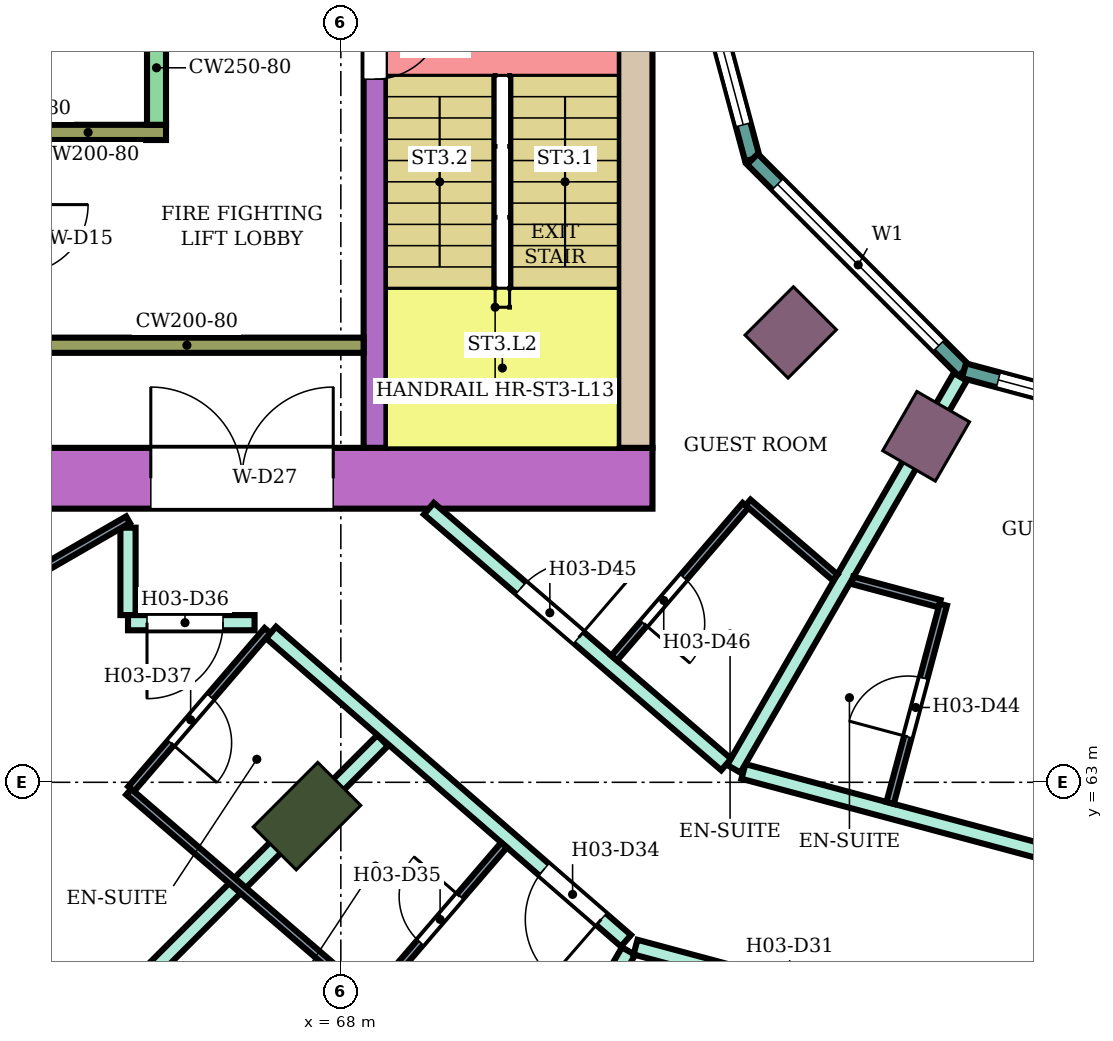
"""IFC4 building model, lengths in metres.
Left out: names, types, materials, properties, quantities, classifications, styles, units other than length and angle.
Written with IfcOpenShell. Run it as: python <this file> out.ifc"""

import sys

from ifc_helpers import new_model, si_unit, direction, frame, frame_2d, origin, origin_2d, place, context, subcontext, project, spatial, rectangle, extrude, element, fill, save


model = new_model("IFC4")
c1 = context("Model", 3, precision=1e-05, world=origin(), true_north=direction((0.0, 1.0)))
c2 = subcontext(c1, "Body", "Model", "MODEL_VIEW")
j1 = project(units=[si_unit("LENGTHUNIT", "METRE"), si_unit("PLANEANGLEUNIT", "RADIAN")], contexts=[c1])
p1 = place(None, origin())
s1 = spatial("IfcSite", under=j1, at=p1, CompositionType="ELEMENT")
p2 = place(p1, origin())
s2 = spatial("IfcBuilding", under=s1, at=p2, CompositionType="ELEMENT")
p3 = place(p2, frame((0.0, 0.0, 59.2)))
s3 = spatial("IfcBuildingStorey", under=s2, at=p3, CompositionType="ELEMENT", Elevation=59.2)
p4 = place(p3, frame((67.555, 62.555, 0.0), z_axis=(0.0, 0.0, 1.0), x_axis=(-0.707106781187, -0.707106781187, 0.0)))
e1 = element("IfcColumn", 1, at=p4, inside=s3, PredefinedType="COLUMN", context=c2, shape_type="SweptSolid", body=[
    extrude(rectangle(XDim=1.2, YDim=0.8, at=origin_2d()), origin(), (0.0, 0.0, 1.0), 3.8),
])
for number, where, z_axis, x_axis in (
    (2, (73.919, 68.919, 0.0), (0.0, 0.0, 1.0), (-0.707, -0.707, 0.0)),
    (3, (75.7, 67.552, 0.0), (0.0, 0.0, 1.0), (-0.5, -0.866, 0.0)),
):
    element("IfcColumn", number, at=place(p3, frame(where, z_axis=z_axis, x_axis=x_axis)), inside=s3, PredefinedType="COLUMN", context=c2, shape_type="SweptSolid", body=[
        extrude(rectangle(XDim=0.9, YDim=0.8, at=origin_2d()), origin(), (0.0, 0.0, 1.0), 3.8),
    ])
p5 = place(p3, frame((72.1, 67.0, 0.0), z_axis=(0.0, 0.0, 1.0), x_axis=(-1.0, 0.0, 0.0)))
e4 = element("IfcWall", 4, at=p5, inside=s3, PredefinedType="SHEAR", context=c2, shape_type="SweptSolid", body=[
    extrude(rectangle(XDim=14.7, YDim=0.8, at=frame_2d((7.35, 0.0))), origin(), (0.0, 0.0, 1.0), 3.48),
])
p6 = place(p5, frame((4.2, 0.0, 0.0)))
e5 = element("IfcOpeningElement", 5, at=p6, cuts=e4, PredefinedType="OPENING", context=c2, shape_type="SweptSolid", body=[
    extrude(rectangle(XDim=2.4, YDim=2.4, at=frame_2d((1.2, 1.2))), frame((0.0, 0.41, 0.0), z_axis=(0.0, -1.0, 0.0), x_axis=(1.0, 0.0, 0.0)), (0.0, 0.0, 1.0), 0.82),
])
p7 = place(p3, frame((71.875, 75.0, 0.0), z_axis=(0.0, 0.0, 1.0), x_axis=(0.0, -1.0, 0.0)))
e6 = element("IfcWall", 6, at=p7, inside=s3, PredefinedType="SHEAR", context=c2, shape_type="SweptSolid", body=[
    extrude(rectangle(XDim=7.6, YDim=0.45, at=frame_2d((3.8, 0.0))), origin(), (0.0, 0.0, 1.0), 3.48),
])
p8 = place(p3, frame((68.45, 75.0, 0.0), z_axis=(0.0, 0.0, 1.0), x_axis=(0.0, -1.0, 0.0)))
e7 = element("IfcWall", 7, at=p8, inside=s3, PredefinedType="SHEAR", context=c2, shape_type="SweptSolid", body=[
    extrude(rectangle(XDim=7.6, YDim=0.3, at=frame_2d((3.8, 0.0))), origin(), (0.0, 0.0, 1.0), 3.48),
])
p9 = place(p8, frame((1.85, 0.0, 0.0)))
e8 = element("IfcOpeningElement", 8, at=p9, cuts=e7, PredefinedType="OPENING", context=c2, shape_type="SweptSolid", body=[
    extrude(rectangle(XDim=0.9, YDim=2.1, at=frame_2d((0.45, 1.05))), frame((0.0, 0.16, 0.0), z_axis=(0.0, -1.0, 0.0), x_axis=(1.0, 0.0, 0.0)), (0.0, 0.0, 1.0), 0.32),
])
p10 = place(p3, frame((68.3, 68.75, 0.0), z_axis=(0.0, 0.0, 1.0), x_axis=(-1.0, 0.0, 0.0)))
e9 = element("IfcWall", 9, at=p10, inside=s3, PredefinedType="SHEAR", context=c2, shape_type="SweptSolid", body=[
    extrude(rectangle(XDim=4.65, YDim=0.2, at=frame_2d((2.325, 0.0))), origin(), (0.0, 0.0, 1.0), 3.48),
])
p11 = place(p3, frame((65.7, 71.55, 0.0), z_axis=(0.0, 0.0, 1.0), x_axis=(-1.0, 0.0, 0.0)))
e10 = element("IfcWall", 10, at=p11, inside=s3, PredefinedType="SHEAR", context=c2, shape_type="SweptSolid", body=[
    extrude(rectangle(XDim=2.05, YDim=0.2, at=frame_2d((1.025, 0.0))), origin(), (0.0, 0.0, 1.0), 3.48),
])
p12 = place(p3, frame((65.575, 73.15, 0.0), z_axis=(0.0, 0.0, 1.0), x_axis=(0.0, -1.0, 0.0)))
e11 = element("IfcWall", 11, at=p12, inside=s3, PredefinedType="SHEAR", context=c2, shape_type="SweptSolid", body=[
    extrude(rectangle(XDim=1.5, YDim=0.25, at=frame_2d((0.75, 0.0))), origin(), (0.0, 0.0, 1.0), 3.48),
])
p13 = place(p3, frame((72.396, 75.0, 0.0), z_axis=(0.0, 0.0, 1.0), x_axis=(0.258789828301, -0.965933654434, 0.0)))
e12 = element("IfcWall", 12, at=p13, inside=s3, PredefinedType="NOTDEFINED", context=c2, shape_type="SweptSolid", body=[
    extrude(rectangle(XDim=3.936, YDim=0.2, at=frame_2d((1.968, 0.0))), origin(), (0.0, 0.0, 1.0), 3.8),
])
p14 = place(p13, frame((0.468, 0.0, 0.9)))
e13 = element("IfcOpeningElement", 13, at=p14, cuts=e12, PredefinedType="OPENING", context=c2, shape_type="SweptSolid", body=[
    extrude(rectangle(XDim=3.0, YDim=2.3, at=frame_2d((1.5, 1.15))), frame((0.0, 0.11, 0.0), z_axis=(0.0, -1.0, 0.0), x_axis=(1.0, 0.0, 0.0)), (0.0, 0.0, 1.0), 0.22),
])
p15 = place(p3, frame((73.415, 71.198, 0.0), z_axis=(0.0, 0.0, 1.0), x_axis=(0.707106781187, -0.707106781187, 0.0)))
e14 = element("IfcWall", 14, at=p15, inside=s3, PredefinedType="NOTDEFINED", context=c2, shape_type="SweptSolid", body=[
    extrude(rectangle(XDim=3.936, YDim=0.2, at=frame_2d((1.968, 0.0))), origin(), (0.0, 0.0, 1.0), 3.8),
])
p16 = place(p15, frame((0.468, 0.0, 0.9)))
e15 = element("IfcOpeningElement", 15, at=p16, cuts=e14, PredefinedType="OPENING", context=c2, shape_type="SweptSolid", body=[
    extrude(rectangle(XDim=3.0, YDim=2.3, at=frame_2d((1.5, 1.15))), frame((0.0, 0.11, 0.0), z_axis=(0.0, -1.0, 0.0), x_axis=(1.0, 0.0, 0.0)), (0.0, 0.0, 1.0), 0.22),
])
p17 = place(p3, frame((76.198, 68.415, 0.0), z_axis=(0.0, 0.0, 1.0), x_axis=(0.965933654434, -0.258789828301, 0.0)))
e16 = element("IfcWall", 16, at=p17, inside=s3, PredefinedType="NOTDEFINED", context=c2, shape_type="SweptSolid", body=[
    extrude(rectangle(XDim=3.936, YDim=0.2, at=frame_2d((1.968, 0.0))), origin(), (0.0, 0.0, 1.0), 3.8),
])
p18 = place(p17, frame((0.468, 0.0, 0.9)))
e17 = element("IfcOpeningElement", 17, at=p18, cuts=e16, PredefinedType="OPENING", context=c2, shape_type="SweptSolid", body=[
    extrude(rectangle(XDim=3.0, YDim=2.3, at=frame_2d((1.5, 1.15))), frame((0.0, 0.11, 0.0), z_axis=(0.0, -1.0, 0.0), x_axis=(1.0, 0.0, 0.0)), (0.0, 0.0, 1.0), 0.22),
])
p19 = place(p3, frame((63.596, 58.596, 0.0), z_axis=(0.0, 0.0, 1.0), x_axis=(0.707106781187, 0.707106781187, 0.0)))
e18 = element("IfcWall", 18, at=p19, inside=s3, PredefinedType="PARTITIONING", context=c2, shape_type="SweptSolid", body=[
    extrude(rectangle(XDim=7.005, YDim=0.2, at=frame_2d((3.503, 0.0))), origin(), (0.0, 0.0, 1.0), 3.35),
])
p20 = place(p3, frame((65.2, 65.2, 0.0), z_axis=(0.0, 0.0, 1.0), x_axis=(0.0, 1.0, 0.0)))
e19 = element("IfcWall", 19, at=p20, inside=s3, PredefinedType="PARTITIONING", context=c2, shape_type="SweptSolid", body=[
    extrude(rectangle(XDim=1.15, YDim=0.2, at=frame_2d((0.575, 0.0))), origin(), (0.0, 0.0, 1.0), 3.35),
])
p21 = place(p3, frame((65.2, 65.1, 0.0), z_axis=(0.0, 0.0, 1.0), x_axis=(1.0, 0.0, 0.0)))
e20 = element("IfcWall", 20, at=p21, inside=s3, PredefinedType="PARTITIONING", context=c2, shape_type="SweptSolid", body=[
    extrude(rectangle(XDim=1.665, YDim=0.2, at=frame_2d((0.833, 0.0))), origin(), (0.0, 0.0, 1.0), 3.35),
])
p22 = place(p21, frame((0.25, 0.0, 0.0)))
e21 = element("IfcOpeningElement", 21, at=p22, cuts=e20, PredefinedType="OPENING", context=c2, shape_type="SweptSolid", body=[
    extrude(rectangle(XDim=1.0, YDim=2.1, at=frame_2d((0.5, 1.05))), frame((0.0, 0.11, 0.0), z_axis=(0.0, -1.0, 0.0), x_axis=(1.0, 0.0, 0.0)), (0.0, 0.0, 1.0), 0.22),
])
p23 = place(p3, frame((67.081, 64.971, 0.0), z_axis=(0.0, 0.0, 1.0), x_axis=(0.755031061605, -0.65568902386, 0.0)))
e22 = element("IfcWall", 22, at=p23, inside=s3, PredefinedType="PARTITIONING", context=c2, shape_type="SweptSolid", body=[
    extrude(rectangle(XDim=6.186, YDim=0.2, at=frame_2d((3.093, 0.0))), origin(), (0.0, 0.0, 1.0), 3.35),
])
p24 = place(p23, frame((4.755, 0.0, 0.0)))
e23 = element("IfcOpeningElement", 23, at=p24, cuts=e22, PredefinedType="OPENING", context=c2, shape_type="SweptSolid", body=[
    extrude(rectangle(XDim=1.0, YDim=2.1, at=frame_2d((0.5, 1.05))), frame((0.0, 0.11, 0.0), z_axis=(0.0, -1.0, 0.0), x_axis=(1.0, 0.0, 0.0)), (0.0, 0.0, 1.0), 0.22),
])
p25 = place(p3, frame((67.095, 52.662, 0.0), z_axis=(0.0, 0.0, 1.0), x_axis=(0.500247659952, 0.865882370021, 0.0)))
e24 = element("IfcWall", 24, at=p25, inside=s3, PredefinedType="PARTITIONING", context=c2, shape_type="SweptSolid", body=[
    extrude(rectangle(XDim=9.375, YDim=0.2, at=frame_2d((4.688, 0.0))), origin(), (0.0, 0.0, 1.0), 3.35),
])
p26 = place(p3, frame((69.158, 66.6, 0.0), z_axis=(0.0, 0.0, 1.0), x_axis=(0.757976058094, -0.652282373943, 0.0)))
e25 = element("IfcWall", 25, at=p26, inside=s3, PredefinedType="PARTITIONING", context=c2, shape_type="SweptSolid", body=[
    extrude(rectangle(XDim=5.16, YDim=0.2, at=frame_2d((2.58, 0.0))), origin(), (0.0, 0.0, 1.0), 3.35),
])
p27 = place(p26, frame((1.6, 0.0, 0.0)))
e26 = element("IfcOpeningElement", 26, at=p27, cuts=e25, PredefinedType="OPENING", context=c2, shape_type="SweptSolid", body=[
    extrude(rectangle(XDim=1.0, YDim=2.1, at=frame_2d((0.5, 1.05))), frame((0.0, 0.11, 0.0), z_axis=(0.0, -1.0, 0.0), x_axis=(1.0, 0.0, 0.0)), (0.0, 0.0, 1.0), 0.22),
])
p28 = place(p3, frame((71.877, 60.831, 0.0), z_axis=(0.0, 0.0, 1.0), x_axis=(0.965852509869, -0.259092510851, 0.0)))
e27 = element("IfcWall", 27, at=p28, inside=s3, PredefinedType="PARTITIONING", context=c2, shape_type="SweptSolid", body=[
    extrude(rectangle(XDim=8.32, YDim=0.2, at=frame_2d((4.16, 0.0))), origin(), (0.0, 0.0, 1.0), 3.35),
])
p29 = place(p28, frame((6.86, 0.0, 0.0)))
e28 = element("IfcOpeningElement", 28, at=p29, cuts=e27, PredefinedType="OPENING", context=c2, shape_type="SweptSolid", body=[
    extrude(rectangle(XDim=1.0, YDim=2.1, at=frame_2d((0.5, 1.05))), frame((0.0, 0.11, 0.0), z_axis=(0.0, -1.0, 0.0), x_axis=(1.0, 0.0, 0.0)), (0.0, 0.0, 1.0), 0.22),
])
p30 = place(p28, frame((1.6, 0.0, 0.0)))
e29 = element("IfcOpeningElement", 29, at=p30, cuts=e27, PredefinedType="OPENING", context=c2, shape_type="SweptSolid", body=[
    extrude(rectangle(XDim=1.0, YDim=2.1, at=frame_2d((0.5, 1.05))), frame((0.0, 0.11, 0.0), z_axis=(0.0, -1.0, 0.0), x_axis=(1.0, 0.0, 0.0)), (0.0, 0.0, 1.0), 0.22),
])
p31 = place(p3, frame((73.297, 63.143, 0.0), z_axis=(0.0, 0.0, 1.0), x_axis=(0.965859030528, -0.25906820173, 0.0)))
e30 = element("IfcWall", 30, at=p31, inside=s3, PredefinedType="PARTITIONING", context=c2, shape_type="SweptSolid", body=[
    extrude(rectangle(XDim=6.81, YDim=0.2, at=frame_2d((3.405, 0.0))), origin(), (0.0, 0.0, 1.0), 3.35),
])
p32 = place(p31, frame((5.39, 0.0, 0.0)))
e31 = element("IfcOpeningElement", 31, at=p32, cuts=e30, PredefinedType="OPENING", context=c2, shape_type="SweptSolid", body=[
    extrude(rectangle(XDim=1.0, YDim=2.1, at=frame_2d((0.5, 1.05))), frame((0.0, 0.11, 0.0), z_axis=(0.0, -1.0, 0.0), x_axis=(1.0, 0.0, 0.0)), (0.0, 0.0, 1.0), 0.22),
])
p33 = place(p3, frame((73.17, 63.177, 0.0), z_axis=(0.0, 0.0, 1.0), x_axis=(0.500239348149, 0.865887171959, 0.0)))
e32 = element("IfcWall", 32, at=p33, inside=s3, PredefinedType="PARTITIONING", context=c2, shape_type="SweptSolid", body=[
    extrude(rectangle(XDim=5.955, YDim=0.2, at=frame_2d((2.978, 0.0))), origin(), (0.0, 0.0, 1.0), 3.35),
])
p34 = place(p3, frame((57.659, 62.101, 0.0), z_axis=(0.0, 0.0, 1.0), x_axis=(0.86602264145, 0.500004784474, 0.0)))
e33 = element("IfcWall", 33, at=p34, inside=s3, PredefinedType="PARTITIONING", context=c2, shape_type="SweptSolid", body=[
    extrude(rectangle(XDim=8.708, YDim=0.1, at=frame_2d((4.354, 0.0))), origin(), (0.0, 0.0, 1.0), 3.35),
])
p35 = place(p34, frame((3.929, 0.0, 0.0)))
e34 = element("IfcOpeningElement", 34, at=p35, cuts=e33, PredefinedType="OPENING", context=c2, shape_type="SweptSolid", body=[
    extrude(rectangle(XDim=0.9, YDim=2.1, at=frame_2d((0.45, 1.05))), frame((0.0, 0.06, 0.0), z_axis=(0.0, -1.0, 0.0), x_axis=(1.0, 0.0, 0.0)), (0.0, 0.0, 1.0), 0.12),
])
p36 = place(p3, frame((65.242, 62.912, 0.0), z_axis=(0.0, 0.0, 1.0), x_axis=(0.652069888227, 0.758158862553, 0.0)))
e35 = element("IfcWall", 35, at=p36, inside=s3, PredefinedType="PARTITIONING", context=c2, shape_type="SweptSolid", body=[
    extrude(rectangle(XDim=2.75, YDim=0.1, at=frame_2d((1.375, 0.0))), origin(), (0.0, 0.0, 1.0), 3.35),
])
p37 = place(p36, frame((0.8, 0.0, 0.0)))
e36 = element("IfcOpeningElement", 36, at=p37, cuts=e35, PredefinedType="OPENING", context=c2, shape_type="SweptSolid", body=[
    extrude(rectangle(XDim=0.8, YDim=2.1, at=frame_2d((0.4, 1.05))), frame((0.0, 0.06, 0.0), z_axis=(0.0, -1.0, 0.0), x_axis=(1.0, 0.0, 0.0)), (0.0, 0.0, 1.0), 0.12),
])
p38 = place(p3, frame((65.209, 62.875, 0.0), z_axis=(0.0, 0.0, 1.0), x_axis=(0.757930378138, -0.652335451969, 0.0)))
e37 = element("IfcWall", 37, at=p38, inside=s3, PredefinedType="PARTITIONING", context=c2, shape_type="SweptSolid", body=[
    extrude(rectangle(XDim=4.15, YDim=0.1, at=frame_2d((2.075, 0.0))), origin(), (0.0, 0.0, 1.0), 3.35),
])
p39 = place(p3, frame((68.393, 60.135, 0.0), z_axis=(0.0, 0.0, 1.0), x_axis=(0.652061182569, 0.758166349944, 0.0)))
e38 = element("IfcWall", 38, at=p39, inside=s3, PredefinedType="PARTITIONING", context=c2, shape_type="SweptSolid", body=[
    extrude(rectangle(XDim=2.69, YDim=0.1, at=frame_2d((1.345, 0.0))), origin(), (0.0, 0.0, 1.0), 3.35),
])
p40 = place(p39, frame((1.0, 0.0, 0.0)))
e39 = element("IfcOpeningElement", 39, at=p40, cuts=e38, PredefinedType="OPENING", context=c2, shape_type="SweptSolid", body=[
    extrude(rectangle(XDim=0.8, YDim=2.1, at=frame_2d((0.4, 1.05))), frame((0.0, 0.06, 0.0), z_axis=(0.0, -1.0, 0.0), x_axis=(1.0, 0.0, 0.0)), (0.0, 0.0, 1.0), 0.12),
])
p41 = place(p3, frame((71.596, 64.635, 0.0), z_axis=(0.0, 0.0, 1.0), x_axis=(0.652285007511, 0.757973791748, 0.0)))
e40 = element("IfcWall", 40, at=p41, inside=s3, PredefinedType="PARTITIONING", context=c2, shape_type="SweptSolid", body=[
    extrude(rectangle(XDim=2.65, YDim=0.1, at=frame_2d((1.325, 0.0))), origin(), (0.0, 0.0, 1.0), 3.35),
])
p42 = place(p41, frame((0.6, 0.0, 0.0)))
e41 = element("IfcOpeningElement", 41, at=p42, cuts=e40, PredefinedType="OPENING", context=c2, shape_type="SweptSolid", body=[
    extrude(rectangle(XDim=0.8, YDim=2.1, at=frame_2d((0.4, 1.05))), frame((0.0, 0.06, 0.0), z_axis=(0.0, -1.0, 0.0), x_axis=(1.0, 0.0, 0.0)), (0.0, 0.0, 1.0), 0.12),
])
p43 = place(p3, frame((73.357, 66.681, 0.0), z_axis=(0.0, 0.0, 1.0), x_axis=(0.758263469747, -0.651948242154, 0.0)))
e42 = element("IfcWall", 42, at=p43, inside=s3, PredefinedType="PARTITIONING", context=c2, shape_type="SweptSolid", body=[
    extrude(rectangle(XDim=1.511, YDim=0.1, at=frame_2d((0.755, 0.0))), origin(), (0.0, 0.0, 1.0), 3.35),
])
p44 = place(p3, frame((74.729, 65.657, 0.0), z_axis=(0.0, 0.0, 1.0), x_axis=(0.965948051503, -0.258736085224, 0.0)))
e43 = element("IfcWall", 43, at=p44, inside=s3, PredefinedType="PARTITIONING", context=c2, shape_type="SweptSolid", body=[
    extrude(rectangle(XDim=1.189, YDim=0.1, at=frame_2d((0.594, 0.0))), origin(), (0.0, 0.0, 1.0), 3.35),
])
p45 = place(p3, frame((75.227, 62.729, 0.0), z_axis=(0.0, 0.0, 1.0), x_axis=(0.258945475746, 0.965891940432, 0.0)))
e44 = element("IfcWall", 44, at=p45, inside=s3, PredefinedType="PARTITIONING", context=c2, shape_type="SweptSolid", body=[
    extrude(rectangle(XDim=2.7, YDim=0.1, at=frame_2d((1.35, 0.0))), origin(), (0.0, 0.0, 1.0), 3.35),
])
p46 = place(p45, frame((0.9, 0.0, 0.0)))
e45 = element("IfcOpeningElement", 45, at=p46, cuts=e44, PredefinedType="OPENING", context=c2, shape_type="SweptSolid", body=[
    extrude(rectangle(XDim=0.8, YDim=2.1, at=frame_2d((0.4, 1.05))), frame((0.0, 0.06, 0.0), z_axis=(0.0, -1.0, 0.0), x_axis=(1.0, 0.0, 0.0)), (0.0, 0.0, 1.0), 0.12),
])
p47 = place(p14, origin())
e46 = element("IfcWindow", 46, at=p47, inside=s3, PartitioningType="SINGLE_PANEL", PredefinedType="WINDOW", context=c2, shape_type="SweptSolid", body=[
    extrude(rectangle(XDim=3.0, YDim=2.3, at=frame_2d((1.5, 1.15))), frame((0.0, 0.03, 0.0), z_axis=(0.0, -1.0, 0.0), x_axis=(1.0, 0.0, 0.0)), (0.0, 0.0, 1.0), 0.06),
])
fill(e13, e46)
p48 = place(p16, origin())
e47 = element("IfcWindow", 47, at=p48, inside=s3, PartitioningType="SINGLE_PANEL", PredefinedType="WINDOW", context=c2, shape_type="SweptSolid", body=[
    extrude(rectangle(XDim=3.0, YDim=2.3, at=frame_2d((1.5, 1.15))), frame((0.0, 0.03, 0.0), z_axis=(0.0, -1.0, 0.0), x_axis=(1.0, 0.0, 0.0)), (0.0, 0.0, 1.0), 0.06),
])
fill(e15, e47)
p49 = place(p18, origin())
e48 = element("IfcWindow", 48, at=p49, inside=s3, PartitioningType="SINGLE_PANEL", PredefinedType="WINDOW", context=c2, shape_type="SweptSolid", body=[
    extrude(rectangle(XDim=3.0, YDim=2.3, at=frame_2d((1.5, 1.15))), frame((0.0, 0.03, 0.0), z_axis=(0.0, -1.0, 0.0), x_axis=(1.0, 0.0, 0.0)), (0.0, 0.0, 1.0), 0.06),
])
fill(e17, e48)
p50 = place(p24, frame((1.0, 0.0, 0.0), z_axis=(0.0, 0.0, 1.0), x_axis=(-1.0, 0.0, 0.0)))
e49 = element("IfcDoor", 49, at=p50, inside=s3, OperationType="SINGLE_SWING_LEFT", PredefinedType="DOOR", context=c2, shape_type="SweptSolid", body=[
    extrude(rectangle(XDim=1.0, YDim=2.1, at=frame_2d((0.5, 1.05))), frame((0.0, 0.025, 0.0), z_axis=(0.0, -1.0, 0.0), x_axis=(1.0, 0.0, 0.0)), (0.0, 0.0, 1.0), 0.05),
])
fill(e23, e49)
p51 = place(p40, origin())
e50 = element("IfcDoor", 50, at=p51, inside=s3, OperationType="SINGLE_SWING_RIGHT", PredefinedType="DOOR", context=c2, shape_type="SweptSolid", body=[
    extrude(rectangle(XDim=0.8, YDim=2.1, at=frame_2d((0.4, 1.05))), frame((0.0, 0.025, 0.0), z_axis=(0.0, -1.0, 0.0), x_axis=(1.0, 0.0, 0.0)), (0.0, 0.0, 1.0), 0.05),
])
fill(e39, e50)
p52 = place(p22, frame((1.0, 0.0, 0.0), z_axis=(0.0, 0.0, 1.0), x_axis=(-1.0, 0.0, 0.0)))
e51 = element("IfcDoor", 51, at=p52, inside=s3, OperationType="SINGLE_SWING_RIGHT", PredefinedType="DOOR", context=c2, shape_type="SweptSolid", body=[
    extrude(rectangle(XDim=1.0, YDim=2.1, at=frame_2d((0.5, 1.05))), frame((0.0, 0.025, 0.0), z_axis=(0.0, -1.0, 0.0), x_axis=(1.0, 0.0, 0.0)), (0.0, 0.0, 1.0), 0.05),
])
fill(e21, e51)
p53 = place(p37, frame((0.8, 0.0, 0.0), z_axis=(0.0, 0.0, 1.0), x_axis=(-1.0, 0.0, 0.0)))
e52 = element("IfcDoor", 52, at=p53, inside=s3, OperationType="SINGLE_SWING_RIGHT", PredefinedType="DOOR", context=c2, shape_type="SweptSolid", body=[
    extrude(rectangle(XDim=0.8, YDim=2.1, at=frame_2d((0.4, 1.05))), frame((0.0, 0.025, 0.0), z_axis=(0.0, -1.0, 0.0), x_axis=(1.0, 0.0, 0.0)), (0.0, 0.0, 1.0), 0.05),
])
fill(e36, e52)
p54 = place(p46, origin())
e53 = element("IfcDoor", 53, at=p54, inside=s3, OperationType="SINGLE_SWING_LEFT", PredefinedType="DOOR", context=c2, shape_type="SweptSolid", body=[
    extrude(rectangle(XDim=0.8, YDim=2.1, at=frame_2d((0.4, 1.05))), frame((0.0, 0.025, 0.0), z_axis=(0.0, -1.0, 0.0), x_axis=(1.0, 0.0, 0.0)), (0.0, 0.0, 1.0), 0.05),
])
fill(e45, e53)
p55 = place(p27, origin())
e54 = element("IfcDoor", 54, at=p55, inside=s3, OperationType="SINGLE_SWING_RIGHT", PredefinedType="DOOR", context=c2, shape_type="SweptSolid", body=[
    extrude(rectangle(XDim=1.0, YDim=2.1, at=frame_2d((0.5, 1.05))), frame((0.0, 0.025, 0.0), z_axis=(0.0, -1.0, 0.0), x_axis=(1.0, 0.0, 0.0)), (0.0, 0.0, 1.0), 0.05),
])
fill(e26, e54)
p56 = place(p42, frame((0.8, 0.0, 0.0), z_axis=(0.0, 0.0, 1.0), x_axis=(-1.0, 0.0, 0.0)))
e55 = element("IfcDoor", 55, at=p56, inside=s3, OperationType="SINGLE_SWING_RIGHT", PredefinedType="DOOR", context=c2, shape_type="SweptSolid", body=[
    extrude(rectangle(XDim=0.8, YDim=2.1, at=frame_2d((0.4, 1.05))), frame((0.0, 0.025, 0.0), z_axis=(0.0, -1.0, 0.0), x_axis=(1.0, 0.0, 0.0)), (0.0, 0.0, 1.0), 0.05),
])
fill(e41, e55)
p57 = place(p9, origin())
e56 = element("IfcDoor", 56, at=p57, inside=s3, OperationType="SINGLE_SWING_LEFT", PredefinedType="DOOR", context=c2, shape_type="SweptSolid", body=[
    extrude(rectangle(XDim=0.9, YDim=2.1, at=frame_2d((0.45, 1.05))), frame((0.0, 0.025, 0.0), z_axis=(0.0, -1.0, 0.0), x_axis=(1.0, 0.0, 0.0)), (0.0, 0.0, 1.0), 0.05),
])
fill(e8, e56)
p58 = place(p6, frame((2.4, 0.0, 0.0), z_axis=(0.0, 0.0, 1.0), x_axis=(-1.0, 0.0, 0.0)))
e57 = element("IfcDoor", 57, at=p58, inside=s3, OperationType="DOUBLE_DOOR_SINGLE_SWING", PredefinedType="DOOR", context=c2, shape_type="SweptSolid", body=[
    extrude(rectangle(XDim=2.4, YDim=2.4, at=frame_2d((1.2, 1.2))), frame((0.0, 0.025, 0.0), z_axis=(0.0, -1.0, 0.0), x_axis=(1.0, 0.0, 0.0)), (0.0, 0.0, 1.0), 0.05),
])
fill(e5, e57)
save(model, sys.argv[1])
